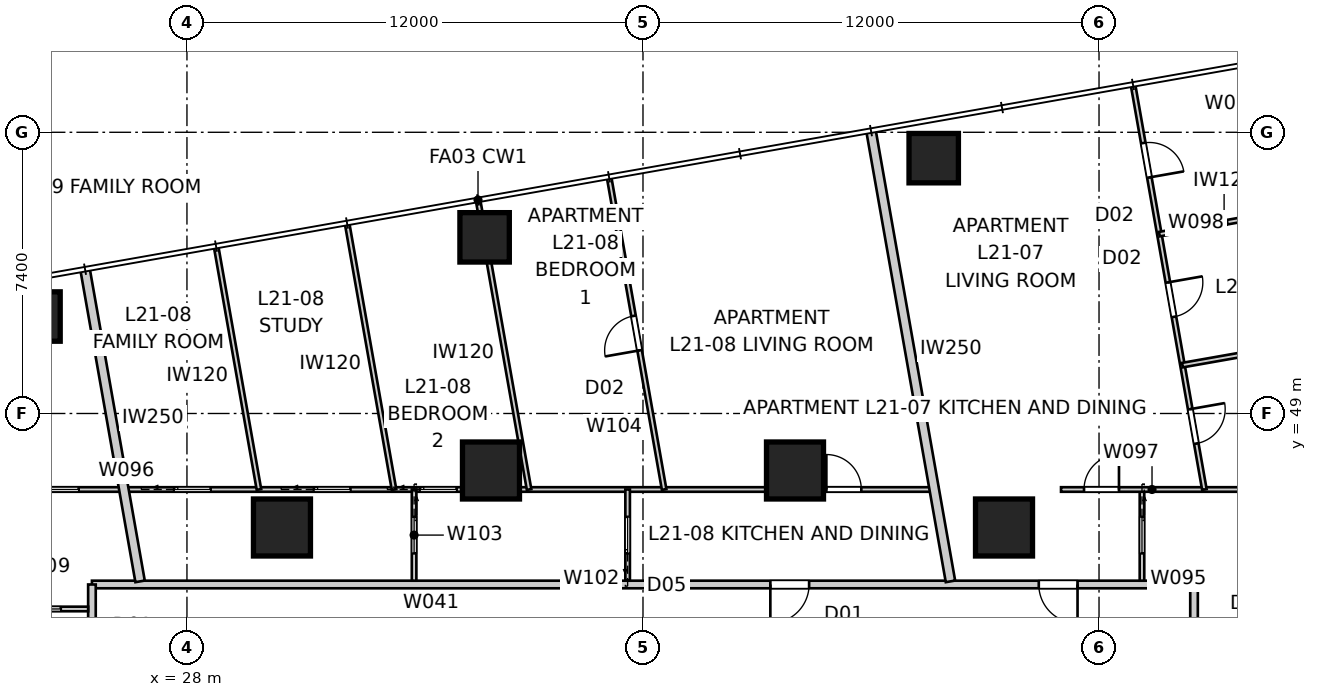
"""IFC4 building model, lengths in metres.
Left out: names, types, materials, properties, quantities, classifications, styles, units other than length and angle.
Written with IfcOpenShell. Run it as: python <this file> out.ifc"""

import sys

from ifc_helpers import new_model, si_unit, direction, frame, frame_2d, origin, origin_2d, place, context, subcontext, project, spatial, rectangle, extrude, element, fill, save


model = new_model("IFC4")
c1 = context("Model", 3, precision=1e-05, world=origin(), true_north=direction((0.0, 1.0)))
c2 = subcontext(c1, "Body", "Model", "MODEL_VIEW")
j1 = project(units=[si_unit("LENGTHUNIT", "METRE"), si_unit("PLANEANGLEUNIT", "RADIAN")], contexts=[c1])
p1 = place(None, origin())
s1 = spatial("IfcSite", under=j1, at=p1, CompositionType="ELEMENT")
p2 = place(p1, origin())
s2 = spatial("IfcBuilding", under=s1, at=p2, CompositionType="ELEMENT")
p3 = place(p2, frame((0.0, 0.0, 79.4)))
s3 = spatial("IfcBuildingStorey", under=s2, at=p3, CompositionType="ELEMENT", Elevation=79.4)
for number, where, z_axis, x_axis in (
    (1, (47.65, 55.719, -0.15), (0.0, 0.0, 1.0), (1.0, 0.0, 0.0)),
    (2, (35.833, 53.635, -0.15), (0.0, 0.0, 1.0), (1.0, 0.0, 0.0)),
    (3, (24.015, 51.552, -0.15), (0.0, 0.0, 1.0), (1.0, 0.0, 0.0)),
):
    element("IfcColumn", number, at=place(p3, frame(where, z_axis=z_axis, x_axis=x_axis)), inside=s3, PredefinedType="COLUMN", context=c2, shape_type="SweptSolid", body=[
        extrude(rectangle(XDim=1.3, YDim=1.3, at=origin_2d()), origin(), (0.0, 0.0, 1.0), 3.55),
    ])
for number, where, z_axis, x_axis in (
    (4, (49.5, 46.0, 0.0), (0.0, 0.0, 1.0), (1.0, 0.0, 0.0)),
    (5, (44.0, 47.5, 0.0), (0.0, 0.0, 1.0), (1.0, 0.0, 0.0)),
    (6, (36.0, 47.5, 0.0), (0.0, 0.0, 1.0), (1.0, 0.0, 0.0)),
    (7, (30.5, 46.0, 0.0), (0.0, 0.0, 1.0), (1.0, 0.0, 0.0)),
):
    element("IfcColumn", number, at=place(p3, frame(where, z_axis=z_axis, x_axis=x_axis)), inside=s3, PredefinedType="COLUMN", context=c2, shape_type="SweptSolid", body=[
        extrude(rectangle(XDim=1.5, YDim=1.5, at=origin_2d()), origin(), (0.0, 0.0, 1.0), 3.4),
    ])
p4 = place(p3, frame((54.5, 15.5, 0.0), z_axis=(0.0, 0.0, 1.0), x_axis=(0.0, 1.0, 0.0)))
e8 = element("IfcWall", 8, at=p4, inside=s3, PredefinedType="PARTITIONING", context=c2, shape_type="SweptSolid", body=[
    extrude(rectangle(XDim=29.0, YDim=0.2, at=frame_2d((14.5, 0.0))), origin(), (0.0, 0.0, 1.0), 3.25),
])
p5 = place(p4, frame((21.815, 0.0, 0.0)))
e9 = element("IfcOpeningElement", 9, at=p5, cuts=e8, PredefinedType="OPENING", context=c2, shape_type="SweptSolid", body=[
    extrude(rectangle(XDim=1.02, YDim=2.34, at=frame_2d((0.51, 1.17))), frame((0.0, 0.11, 0.0), z_axis=(0.0, -1.0, 0.0), x_axis=(1.0, 0.0, 0.0)), (0.0, 0.0, 1.0), 0.22),
])
p6 = place(p4, frame((2.855, 0.0, 0.0)))
e10 = element("IfcOpeningElement", 10, at=p6, cuts=e8, PredefinedType="OPENING", context=c2, shape_type="SweptSolid", body=[
    extrude(rectangle(XDim=1.02, YDim=2.1, at=frame_2d((0.51, 1.05))), frame((0.0, 0.11, 0.0), z_axis=(0.0, -1.0, 0.0), x_axis=(1.0, 0.0, 0.0)), (0.0, 0.0, 1.0), 0.22),
])
p7 = place(p3, frame((54.5, 44.5, 0.0), z_axis=(0.0, 0.0, 1.0), x_axis=(-1.0, 0.0, 0.0)))
e11 = element("IfcWall", 11, at=p7, inside=s3, PredefinedType="PARTITIONING", context=c2, shape_type="SweptSolid", body=[
    extrude(rectangle(XDim=29.0, YDim=0.2, at=frame_2d((14.5, 0.0))), origin(), (0.0, 0.0, 1.0), 3.25),
])
p8 = place(p7, frame((10.129, 0.0, 0.0)))
e12 = element("IfcOpeningElement", 12, at=p8, cuts=e11, PredefinedType="OPENING", context=c2, shape_type="SweptSolid", body=[
    extrude(rectangle(XDim=1.02, YDim=2.34, at=frame_2d((0.51, 1.17))), frame((0.0, 0.11, 0.0), z_axis=(0.0, -1.0, 0.0), x_axis=(1.0, 0.0, 0.0)), (0.0, 0.0, 1.0), 0.22),
])
p9 = place(p7, frame((3.065, 0.0, 0.0)))
e13 = element("IfcOpeningElement", 13, at=p9, cuts=e11, PredefinedType="OPENING", context=c2, shape_type="SweptSolid", body=[
    extrude(rectangle(XDim=1.02, YDim=2.1, at=frame_2d((0.51, 1.05))), frame((0.0, 0.11, 0.0), z_axis=(0.0, -1.0, 0.0), x_axis=(1.0, 0.0, 0.0)), (0.0, 0.0, 1.0), 0.22),
])
p10 = place(p3, frame((25.5, 44.5, 0.0), z_axis=(0.0, 0.0, 1.0), x_axis=(0.0, -1.0, 0.0)))
e14 = element("IfcWall", 14, at=p10, inside=s3, PredefinedType="PARTITIONING", context=c2, shape_type="SweptSolid", body=[
    extrude(rectangle(XDim=29.0, YDim=0.2, at=frame_2d((14.5, 0.0))), origin(), (0.0, 0.0, 1.0), 3.25),
])
p11 = place(p10, frame((12.263, 0.0, 0.0)))
e15 = element("IfcOpeningElement", 15, at=p11, cuts=e14, PredefinedType="OPENING", context=c2, shape_type="SweptSolid", body=[
    extrude(rectangle(XDim=1.02, YDim=2.34, at=frame_2d((0.51, 1.17))), frame((0.0, 0.11, 0.0), z_axis=(0.0, -1.0, 0.0), x_axis=(1.0, 0.0, 0.0)), (0.0, 0.0, 1.0), 0.22),
])
p12 = place(p10, frame((2.018, 0.0, 0.0)))
e16 = element("IfcOpeningElement", 16, at=p12, cuts=e14, PredefinedType="OPENING", context=c2, shape_type="SweptSolid", body=[
    extrude(rectangle(XDim=1.02, YDim=2.34, at=frame_2d((0.51, 1.17))), frame((0.0, 0.11, 0.0), z_axis=(0.0, -1.0, 0.0), x_axis=(1.0, 0.0, 0.0)), (0.0, 0.0, 1.0), 0.22),
])
p13 = place(p3, frame((62.797, 44.682, 0.0), z_axis=(0.0, 0.0, 1.0), x_axis=(-0.984807121942, -0.173651756605, 0.0)))
e17 = element("IfcWall", 17, at=p13, inside=s3, PredefinedType="PARTITIONING", context=c2, shape_type="SweptSolid", body=[
    extrude(rectangle(XDim=8.341, YDim=0.25, at=frame_2d((4.171, 0.0))), origin(), (0.0, 0.0, 1.0), 3.25),
])
p14 = place(p3, frame((45.999, 56.444, 0.0), z_axis=(0.0, 0.0, 1.0), x_axis=(0.173654664517, -0.984806609184, 0.0)))
e18 = element("IfcWall", 18, at=p14, inside=s3, PredefinedType="PARTITIONING", context=c2, shape_type="SweptSolid", body=[
    extrude(rectangle(XDim=12.044, YDim=0.25, at=frame_2d((6.022, 0.0))), origin(), (0.0, 0.0, 1.0), 3.25),
])
p15 = place(p3, frame((25.318, 52.797, 0.0), z_axis=(0.0, 0.0, 1.0), x_axis=(0.173651756605, -0.984807121942, 0.0)))
e19 = element("IfcWall", 19, at=p15, inside=s3, PredefinedType="PARTITIONING", context=c2, shape_type="SweptSolid", body=[
    extrude(rectangle(XDim=8.341, YDim=0.25, at=frame_2d((4.171, 0.0))), origin(), (0.0, 0.0, 1.0), 3.25),
])
p16 = place(p3, frame((53.13, 47.0, 0.0), z_axis=(0.0, 0.0, 1.0), x_axis=(0.0, -1.0, 0.0)))
e20 = element("IfcWall", 20, at=p16, inside=s3, PredefinedType="PARTITIONING", context=c2, shape_type="SweptSolid", body=[
    extrude(rectangle(XDim=2.4, YDim=0.12, at=frame_2d((1.2, 0.0))), origin(), (0.0, 0.0, 1.0), 3.25),
])
p17 = place(p16, frame((0.72, 0.0, 0.0)))
e21 = element("IfcOpeningElement", 21, at=p17, cuts=e20, PredefinedType="OPENING", context=c2, shape_type="SweptSolid", body=[
    extrude(rectangle(XDim=0.96, YDim=2.1, at=frame_2d((0.48, 1.05))), frame((0.0, 0.07, 0.0), z_axis=(0.0, -1.0, 0.0), x_axis=(1.0, 0.0, 0.0)), (0.0, 0.0, 1.0), 0.14),
])
p18 = place(p3, frame((23.0, 47.0, 0.0), z_axis=(0.0, 0.0, 1.0), x_axis=(1.0, 0.0, 0.0)))
e22 = element("IfcWall", 22, at=p18, inside=s3, PredefinedType="PARTITIONING", context=c2, shape_type="SweptSolid", body=[
    extrude(rectangle(XDim=24.771, YDim=0.12, at=frame_2d((12.386, 0.0))), origin(), (0.0, 0.0, 1.0), 2.55),
])
p19 = place(p18, frame((21.825, 0.0, 0.0)))
e23 = element("IfcOpeningElement", 23, at=p19, cuts=e22, PredefinedType="OPENING", context=c2, shape_type="SweptSolid", body=[
    extrude(rectangle(XDim=0.92, YDim=2.34, at=frame_2d((0.46, 1.17))), frame((0.0, 0.07, 0.0), z_axis=(0.0, -1.0, 0.0), x_axis=(1.0, 0.0, 0.0)), (0.0, 0.0, 1.0), 0.14),
])
p20 = place(p18, frame((11.135, 0.0, 0.0)))
e24 = element("IfcOpeningElement", 24, at=p20, cuts=e22, PredefinedType="OPENING", context=c2, shape_type="SweptSolid", body=[
    extrude(rectangle(XDim=0.96, YDim=2.1, at=frame_2d((0.48, 1.05))), frame((0.0, 0.07, 0.0), z_axis=(0.0, -1.0, 0.0), x_axis=(1.0, 0.0, 0.0)), (0.0, 0.0, 1.0), 0.14),
])
p21 = place(p18, frame((1.19, 0.0, 0.0)))
e25 = element("IfcOpeningElement", 25, at=p21, cuts=e22, PredefinedType="OPENING", context=c2, shape_type="SweptSolid", body=[
    extrude(rectangle(XDim=0.96, YDim=2.1, at=frame_2d((0.48, 1.05))), frame((0.0, 0.07, 0.0), z_axis=(0.0, -1.0, 0.0), x_axis=(1.0, 0.0, 0.0)), (0.0, 0.0, 1.0), 0.14),
])
p22 = place(p18, frame((8.342, 0.0, 0.0)))
e26 = element("IfcOpeningElement", 26, at=p22, cuts=e22, PredefinedType="OPENING", context=c2, shape_type="SweptSolid", body=[
    extrude(rectangle(XDim=0.96, YDim=2.1, at=frame_2d((0.48, 1.05))), frame((0.0, 0.07, 0.0), z_axis=(0.0, -1.0, 0.0), x_axis=(1.0, 0.0, 0.0)), (0.0, 0.0, 1.0), 0.14),
])
p23 = place(p18, frame((4.663, 0.0, 0.0)))
e27 = element("IfcOpeningElement", 27, at=p23, cuts=e22, PredefinedType="OPENING", context=c2, shape_type="SweptSolid", body=[
    extrude(rectangle(XDim=0.96, YDim=2.1, at=frame_2d((0.48, 1.05))), frame((0.0, 0.07, 0.0), z_axis=(0.0, -1.0, 0.0), x_axis=(1.0, 0.0, 0.0)), (0.0, 0.0, 1.0), 0.14),
])
p24 = place(p3, frame((51.0, 47.0, 0.0), z_axis=(0.0, 0.0, 1.0), x_axis=(1.0, 0.0, 0.0)))
e28 = element("IfcWall", 28, at=p24, inside=s3, PredefinedType="PARTITIONING", context=c2, shape_type="SweptSolid", body=[
    extrude(rectangle(XDim=4.789, YDim=0.12, at=frame_2d((2.395, 0.0))), origin(), (0.0, 0.0, 1.0), 2.638),
])
p25 = place(p24, frame((0.605, 0.0, 0.0)))
e29 = element("IfcOpeningElement", 29, at=p25, cuts=e28, PredefinedType="OPENING", context=c2, shape_type="SweptSolid", body=[
    extrude(rectangle(XDim=0.92, YDim=2.34, at=frame_2d((0.46, 1.17))), frame((0.0, 0.07, 0.0), z_axis=(0.0, -1.0, 0.0), x_axis=(1.0, 0.0, 0.0)), (0.0, 0.0, 1.0), 0.14),
])
p26 = place(p3, frame((52.9, 57.62, 0.0), z_axis=(0.0, 0.0, 1.0), x_axis=(0.173651010046, -0.984807253583, 0.0)))
e30 = element("IfcWall", 30, at=p26, inside=s3, PredefinedType="PARTITIONING", context=c2, shape_type="SweptSolid", body=[
    extrude(rectangle(XDim=10.783, YDim=0.12, at=frame_2d((5.392, 0.0))), origin(), (0.0, 0.0, 1.0), 3.25),
])
p27 = place(p26, frame((1.525, 0.0, 0.0)))
e31 = element("IfcOpeningElement", 31, at=p27, cuts=e30, PredefinedType="OPENING", context=c2, shape_type="SweptSolid", body=[
    extrude(rectangle(XDim=0.92, YDim=2.34, at=frame_2d((0.46, 1.17))), frame((0.0, 0.07, 0.0), z_axis=(0.0, -1.0, 0.0), x_axis=(1.0, 0.0, 0.0)), (0.0, 0.0, 1.0), 0.14),
])
p28 = place(p26, frame((5.25, 0.0, 0.0)))
e32 = element("IfcOpeningElement", 32, at=p28, cuts=e30, PredefinedType="OPENING", context=c2, shape_type="SweptSolid", body=[
    extrude(rectangle(XDim=0.92, YDim=2.34, at=frame_2d((0.46, 1.17))), frame((0.0, 0.07, 0.0), z_axis=(0.0, -1.0, 0.0), x_axis=(1.0, 0.0, 0.0)), (0.0, 0.0, 1.0), 0.14),
])
p29 = place(p26, frame((8.637, 0.0, 0.0)))
e33 = element("IfcOpeningElement", 33, at=p29, cuts=e30, PredefinedType="OPENING", context=c2, shape_type="SweptSolid", body=[
    extrude(rectangle(XDim=0.92, YDim=2.34, at=frame_2d((0.46, 1.17))), frame((0.0, 0.07, 0.0), z_axis=(0.0, -1.0, 0.0), x_axis=(1.0, 0.0, 0.0)), (0.0, 0.0, 1.0), 0.14),
])
p30 = place(p3, frame((61.542, 51.568, 0.0), z_axis=(0.0, 0.0, 1.0), x_axis=(-0.984807929323, -0.173647177755, 0.0)))
e34 = element("IfcWall", 34, at=p30, inside=s3, PredefinedType="PARTITIONING", context=c2, shape_type="SweptSolid", body=[
    extrude(rectangle(XDim=7.46, YDim=0.12, at=frame_2d((3.73, 0.0))), origin(), (0.0, 0.0, 1.0), 3.25),
])
p31 = place(p3, frame((53.588, 53.72, 0.0), z_axis=(0.0, 0.0, 1.0), x_axis=(0.984805572884, 0.173660541335, 0.0)))
e35 = element("IfcWall", 35, at=p31, inside=s3, PredefinedType="PARTITIONING", context=c2, shape_type="SweptSolid", body=[
    extrude(rectangle(XDim=3.46, YDim=0.12, at=frame_2d((1.73, 0.0))), origin(), (0.0, 0.0, 1.0), 3.25),
])
p32 = place(p3, frame((39.596, 44.6, 0.0), z_axis=(0.0, 0.0, 1.0), x_axis=(0.0, 1.0, 0.0)))
e36 = element("IfcWall", 36, at=p32, inside=s3, PredefinedType="PARTITIONING", context=c2, shape_type="SweptSolid", body=[
    extrude(rectangle(XDim=2.4, YDim=0.12, at=frame_2d((1.2, 0.0))), origin(), (0.0, 0.0, 1.0), 3.25),
])
p33 = place(p32, frame((0.72, 0.0, 0.0)))
e37 = element("IfcOpeningElement", 37, at=p33, cuts=e36, PredefinedType="OPENING", context=c2, shape_type="SweptSolid", body=[
    extrude(rectangle(XDim=0.96, YDim=2.1, at=frame_2d((0.48, 1.05))), frame((0.0, 0.07, 0.0), z_axis=(0.0, -1.0, 0.0), x_axis=(1.0, 0.0, 0.0)), (0.0, 0.0, 1.0), 0.14),
])
p34 = place(p3, frame((33.977, 47.0, 0.0), z_axis=(0.0, 0.0, 1.0), x_axis=(0.0, -1.0, 0.0)))
e38 = element("IfcWall", 38, at=p34, inside=s3, PredefinedType="PARTITIONING", context=c2, shape_type="SweptSolid", body=[
    extrude(rectangle(XDim=2.4, YDim=0.12, at=frame_2d((1.2, 0.0))), origin(), (0.0, 0.0, 1.0), 3.25),
])
p35 = place(p34, frame((0.72, 0.0, 0.0)))
e39 = element("IfcOpeningElement", 39, at=p35, cuts=e38, PredefinedType="OPENING", context=c2, shape_type="SweptSolid", body=[
    extrude(rectangle(XDim=0.96, YDim=2.1, at=frame_2d((0.48, 1.05))), frame((0.0, 0.07, 0.0), z_axis=(0.0, -1.0, 0.0), x_axis=(1.0, 0.0, 0.0)), (0.0, 0.0, 1.0), 0.14),
])
p36 = place(p3, frame((40.556, 47.0, 0.0), z_axis=(0.0, 0.0, 1.0), x_axis=(-0.173647980238, 0.984807787824, 0.0)))
e40 = element("IfcWall", 40, at=p36, inside=s3, PredefinedType="PARTITIONING", context=c2, shape_type="SweptSolid", body=[
    extrude(rectangle(XDim=8.315, YDim=0.12, at=frame_2d((4.157, 0.0))), origin(), (0.0, 0.0, 1.0), 3.25),
])
p37 = place(p36, frame((3.718, 0.0, 0.0)))
e41 = element("IfcOpeningElement", 41, at=p37, cuts=e40, PredefinedType="OPENING", context=c2, shape_type="SweptSolid", body=[
    extrude(rectangle(XDim=0.92, YDim=2.34, at=frame_2d((0.46, 1.17))), frame((0.0, 0.07, 0.0), z_axis=(0.0, -1.0, 0.0), x_axis=(1.0, 0.0, 0.0)), (0.0, 0.0, 1.0), 0.14),
])
p38 = place(p3, frame((37.002, 47.0, 0.0), z_axis=(0.0, 0.0, 1.0), x_axis=(-0.173644207293, 0.984808453088, 0.0)))
e42 = element("IfcWall", 42, at=p38, inside=s3, PredefinedType="PARTITIONING", context=c2, shape_type="SweptSolid", body=[
    extrude(rectangle(XDim=7.698, YDim=0.12, at=frame_2d((3.849, 0.0))), origin(), (0.0, 0.0, 1.0), 3.25),
])
p39 = place(p3, frame((33.448, 47.0, 0.0), z_axis=(0.0, 0.0, 1.0), x_axis=(-0.173639776761, 0.984809234282, 0.0)))
e43 = element("IfcWall", 43, at=p39, inside=s3, PredefinedType="PARTITIONING", context=c2, shape_type="SweptSolid", body=[
    extrude(rectangle(XDim=7.081, YDim=0.12, at=frame_2d((3.541, 0.0))), origin(), (0.0, 0.0, 1.0), 3.25),
])
p40 = place(p3, frame((29.895, 47.0, 0.0), z_axis=(0.0, 0.0, 1.0), x_axis=(-0.173640959323, 0.984809025774, 0.0)))
e44 = element("IfcWall", 44, at=p40, inside=s3, PredefinedType="PARTITIONING", context=c2, shape_type="SweptSolid", body=[
    extrude(rectangle(XDim=6.463, YDim=0.12, at=frame_2d((3.232, 0.0))), origin(), (0.0, 0.0, 1.0), 3.25),
])
p41 = place(p3, frame((23.0, 43.856, 0.0), z_axis=(0.0, 0.0, 1.0), x_axis=(1.0, 0.0, 0.0)))
e45 = element("IfcWall", 45, at=p41, inside=s3, PredefinedType="PARTITIONING", context=c2, shape_type="SweptSolid", body=[
    extrude(rectangle(XDim=2.4, YDim=0.12, at=frame_2d((1.2, 0.0))), origin(), (0.0, 0.0, 1.0), 3.25),
])
p42 = place(p41, frame((0.72, 0.0, 0.0)))
e46 = element("IfcOpeningElement", 46, at=p42, cuts=e45, PredefinedType="OPENING", context=c2, shape_type="SweptSolid", body=[
    extrude(rectangle(XDim=0.96, YDim=2.1, at=frame_2d((0.48, 1.05))), frame((0.0, 0.07, 0.0), z_axis=(0.0, -1.0, 0.0), x_axis=(1.0, 0.0, 0.0)), (0.0, 0.0, 1.0), 0.14),
])
p43 = place(p8, origin())
e47 = element("IfcDoor", 47, at=p43, inside=s3, OperationType="SINGLE_SWING_RIGHT", PredefinedType="DOOR", context=c2, shape_type="SweptSolid", body=[
    extrude(rectangle(XDim=1.02, YDim=2.34, at=frame_2d((0.51, 1.17))), frame((0.0, 0.025, 0.0), z_axis=(0.0, -1.0, 0.0), x_axis=(1.0, 0.0, 0.0)), (0.0, 0.0, 1.0), 0.05),
])
fill(e12, e47)
p44 = place(p9, origin())
e48 = element("IfcDoor", 48, at=p44, inside=s3, OperationType="SINGLE_SWING_LEFT", PredefinedType="DOOR", context=c2, shape_type="SweptSolid", body=[
    extrude(rectangle(XDim=1.02, YDim=2.1, at=frame_2d((0.51, 1.05))), frame((0.0, 0.025, 0.0), z_axis=(0.0, -1.0, 0.0), x_axis=(1.0, 0.0, 0.0)), (0.0, 0.0, 1.0), 0.05),
])
fill(e13, e48)
p45 = place(p19, origin())
e49 = element("IfcDoor", 49, at=p45, inside=s3, OperationType="SINGLE_SWING_LEFT", PredefinedType="DOOR", context=c2, shape_type="SweptSolid", body=[
    extrude(rectangle(XDim=0.92, YDim=2.34, at=frame_2d((0.46, 1.17))), frame((0.0, 0.025, 0.0), z_axis=(0.0, -1.0, 0.0), x_axis=(1.0, 0.0, 0.0)), (0.0, 0.0, 1.0), 0.05),
])
fill(e23, e49)
p46 = place(p33, origin())
e50 = element("IfcDoor", 50, at=p46, inside=s3, OperationType="SLIDING_TO_LEFT", PredefinedType="DOOR", context=c2, shape_type="SweptSolid", body=[
    extrude(rectangle(XDim=0.96, YDim=2.1, at=frame_2d((0.48, 1.05))), frame((0.0, 0.025, 0.0), z_axis=(0.0, -1.0, 0.0), x_axis=(1.0, 0.0, 0.0)), (0.0, 0.0, 1.0), 0.05),
])
fill(e37, e50)
p47 = place(p17, origin())
e51 = element("IfcDoor", 51, at=p47, inside=s3, OperationType="SLIDING_TO_LEFT", PredefinedType="DOOR", context=c2, shape_type="SweptSolid", body=[
    extrude(rectangle(XDim=0.96, YDim=2.1, at=frame_2d((0.48, 1.05))), frame((0.0, 0.025, 0.0), z_axis=(0.0, -1.0, 0.0), x_axis=(1.0, 0.0, 0.0)), (0.0, 0.0, 1.0), 0.05),
])
fill(e21, e51)
p48 = place(p25, origin())
e52 = element("IfcDoor", 52, at=p48, inside=s3, OperationType="SINGLE_SWING_RIGHT", PredefinedType="DOOR", context=c2, shape_type="SweptSolid", body=[
    extrude(rectangle(XDim=0.92, YDim=2.34, at=frame_2d((0.46, 1.17))), frame((0.0, 0.025, 0.0), z_axis=(0.0, -1.0, 0.0), x_axis=(1.0, 0.0, 0.0)), (0.0, 0.0, 1.0), 0.05),
])
fill(e29, e52)
p49 = place(p42, origin())
e53 = element("IfcDoor", 53, at=p49, inside=s3, OperationType="SLIDING_TO_LEFT", PredefinedType="DOOR", context=c2, shape_type="SweptSolid", body=[
    extrude(rectangle(XDim=0.96, YDim=2.1, at=frame_2d((0.48, 1.05))), frame((0.0, 0.025, 0.0), z_axis=(0.0, -1.0, 0.0), x_axis=(1.0, 0.0, 0.0)), (0.0, 0.0, 1.0), 0.05),
])
fill(e46, e53)
p50 = place(p37, origin())
e54 = element("IfcDoor", 54, at=p50, inside=s3, OperationType="SINGLE_SWING_LEFT", PredefinedType="DOOR", context=c2, shape_type="SweptSolid", body=[
    extrude(rectangle(XDim=0.92, YDim=2.34, at=frame_2d((0.46, 1.17))), frame((0.0, 0.025, 0.0), z_axis=(0.0, -1.0, 0.0), x_axis=(1.0, 0.0, 0.0)), (0.0, 0.0, 1.0), 0.05),
])
fill(e41, e54)
p51 = place(p20, origin())
e55 = element("IfcDoor", 55, at=p51, inside=s3, OperationType="SLIDING_TO_LEFT", PredefinedType="DOOR", context=c2, shape_type="SweptSolid", body=[
    extrude(rectangle(XDim=0.96, YDim=2.1, at=frame_2d((0.48, 1.05))), frame((0.0, 0.025, 0.0), z_axis=(0.0, -1.0, 0.0), x_axis=(1.0, 0.0, 0.0)), (0.0, 0.0, 1.0), 0.05),
])
fill(e24, e55)
p52 = place(p35, origin())
e56 = element("IfcDoor", 56, at=p52, inside=s3, OperationType="SLIDING_TO_LEFT", PredefinedType="DOOR", context=c2, shape_type="SweptSolid", body=[
    extrude(rectangle(XDim=0.96, YDim=2.1, at=frame_2d((0.48, 1.05))), frame((0.0, 0.025, 0.0), z_axis=(0.0, -1.0, 0.0), x_axis=(1.0, 0.0, 0.0)), (0.0, 0.0, 1.0), 0.05),
])
fill(e39, e56)
p53 = place(p27, origin())
e57 = element("IfcDoor", 57, at=p53, inside=s3, OperationType="SINGLE_SWING_RIGHT", PredefinedType="DOOR", context=c2, shape_type="SweptSolid", body=[
    extrude(rectangle(XDim=0.92, YDim=2.34, at=frame_2d((0.46, 1.17))), frame((0.0, 0.025, 0.0), z_axis=(0.0, -1.0, 0.0), x_axis=(1.0, 0.0, 0.0)), (0.0, 0.0, 1.0), 0.05),
])
fill(e31, e57)
p54 = place(p28, origin())
e58 = element("IfcDoor", 58, at=p54, inside=s3, OperationType="SINGLE_SWING_LEFT", PredefinedType="DOOR", context=c2, shape_type="SweptSolid", body=[
    extrude(rectangle(XDim=0.92, YDim=2.34, at=frame_2d((0.46, 1.17))), frame((0.0, 0.025, 0.0), z_axis=(0.0, -1.0, 0.0), x_axis=(1.0, 0.0, 0.0)), (0.0, 0.0, 1.0), 0.05),
])
fill(e32, e58)
p55 = place(p29, origin())
e59 = element("IfcDoor", 59, at=p55, inside=s3, OperationType="SINGLE_SWING_LEFT", PredefinedType="DOOR", context=c2, shape_type="SweptSolid", body=[
    extrude(rectangle(XDim=0.92, YDim=2.34, at=frame_2d((0.46, 1.17))), frame((0.0, 0.025, 0.0), z_axis=(0.0, -1.0, 0.0), x_axis=(1.0, 0.0, 0.0)), (0.0, 0.0, 1.0), 0.05),
])
fill(e33, e59)
p56 = place(p21, origin())
e60 = element("IfcDoor", 60, at=p56, inside=s3, OperationType="SLIDING_TO_LEFT", PredefinedType="DOOR", context=c2, shape_type="SweptSolid", body=[
    extrude(rectangle(XDim=0.96, YDim=2.1, at=frame_2d((0.48, 1.05))), frame((0.0, 0.025, 0.0), z_axis=(0.0, -1.0, 0.0), x_axis=(1.0, 0.0, 0.0)), (0.0, 0.0, 1.0), 0.05),
])
fill(e25, e60)
p57 = place(p22, origin())
e61 = element("IfcDoor", 61, at=p57, inside=s3, OperationType="SLIDING_TO_LEFT", PredefinedType="DOOR", context=c2, shape_type="SweptSolid", body=[
    extrude(rectangle(XDim=0.96, YDim=2.1, at=frame_2d((0.48, 1.05))), frame((0.0, 0.025, 0.0), z_axis=(0.0, -1.0, 0.0), x_axis=(1.0, 0.0, 0.0)), (0.0, 0.0, 1.0), 0.05),
])
fill(e26, e61)
p58 = place(p23, origin())
e62 = element("IfcDoor", 62, at=p58, inside=s3, OperationType="SLIDING_TO_LEFT", PredefinedType="DOOR", context=c2, shape_type="SweptSolid", body=[
    extrude(rectangle(XDim=0.96, YDim=2.1, at=frame_2d((0.48, 1.05))), frame((0.0, 0.025, 0.0), z_axis=(0.0, -1.0, 0.0), x_axis=(1.0, 0.0, 0.0)), (0.0, 0.0, 1.0), 0.05),
])
fill(e27, e62)
save(model, sys.argv[1])
